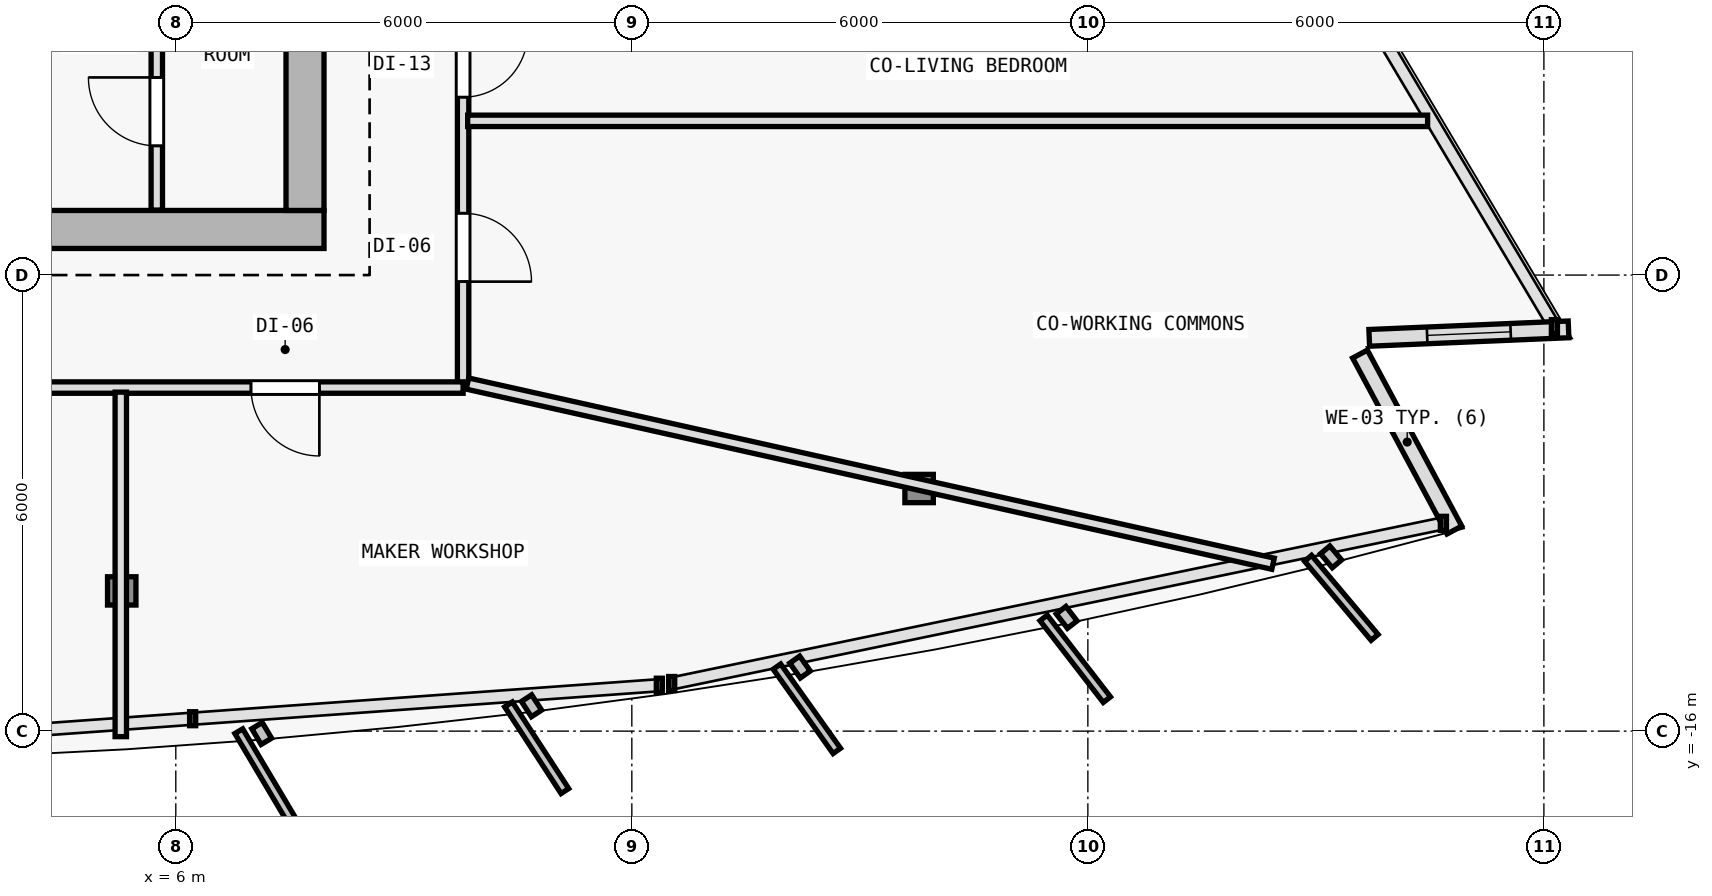
"""IFC4 building model, lengths in metres.
Left out: names, types, materials, properties, quantities, classifications, styles, units other than length and angle.
Written with IfcOpenShell. Run it as: python <this file> out.ifc"""

import sys

from ifc_helpers import new_model, si_unit, direction, frame, frame_2d, origin, origin_2d, place, context, subcontext, project, spatial, rectangle, i_section, extrude, element, fill, save


model = new_model("IFC4")
c1 = context("Model", 3, precision=1e-05, world=origin(), true_north=direction((0.0, 1.0)))
c2 = subcontext(c1, "Body", "Model", "MODEL_VIEW")
j1 = project(units=[si_unit("LENGTHUNIT", "METRE"), si_unit("PLANEANGLEUNIT", "RADIAN")], contexts=[c1])
p1 = place(None, origin())
s1 = spatial("IfcSite", under=j1, at=p1, CompositionType="ELEMENT")
p2 = place(p1, origin())
s2 = spatial("IfcBuilding", under=s1, at=p2, CompositionType="ELEMENT")
p3 = place(p2, frame((0.0, 0.0, 258.0)))
s3 = spatial("IfcBuildingStorey", under=s2, at=p3, CompositionType="ELEMENT", Elevation=258.0)
p4 = place(p3, frame((7.7, -9.4, 0.0), z_axis=(0.0, 0.0, 1.0), x_axis=(1.0, 0.0, 0.0)))
e1 = element("IfcColumn", 1, at=p4, inside=s3, PredefinedType="COLUMN", context=c2, shape_type="SweptSolid", body=[
    extrude(i_section(OverallWidth=0.374, OverallDepth=0.372, WebThickness=0.012, FlangeThickness=0.02, FilletRadius=0.015, at=origin_2d()), origin(), (0.0, 0.0, 1.0), 3.6),
])
p5 = place(p3, frame((5.289, -14.155, 0.006), z_axis=(-0.006934288159, 0.035283289748, 0.999353293441), x_axis=(-0.981229659911, -0.192842823335, 0.0)))
e2 = element("IfcColumn", 2, at=p5, inside=s3, PredefinedType="COLUMN", context=c2, shape_type="SweptSolid", body=[
    extrude(i_section(OverallWidth=0.374, OverallDepth=0.372, WebThickness=0.012, FlangeThickness=0.02, FilletRadius=0.015, at=origin_2d()), origin(), (0.0, 0.0, 1.0), 3.591),
])
p6 = place(p3, frame((15.78, -12.808, 0.006), z_axis=(-0.020596292833, 0.033511459955, 0.999226087917), x_axis=(-0.851954850327, -0.523615252838, 0.0)))
e3 = element("IfcColumn", 3, at=p6, inside=s3, PredefinedType="COLUMN", context=c2, shape_type="SweptSolid", body=[
    extrude(i_section(OverallWidth=0.374, OverallDepth=0.372, WebThickness=0.012, FlangeThickness=0.02, FilletRadius=0.015, at=origin_2d()), origin(), (0.0, 0.0, 1.0), 3.592),
])
p7 = place(p3, frame((21.581, -11.04, 0.0), z_axis=(0.0, 0.0, 1.0), x_axis=(0.472791303324, -0.881174434208, 0.0)))
e4 = element("IfcWall", 4, at=p7, inside=s3, PredefinedType="SOLIDWALL", context=c2, shape_type="SweptSolid", body=[
    extrude(rectangle(XDim=2.627, YDim=0.22, at=frame_2d((1.313, 0.0))), origin(), (0.0, 0.0, 1.0), 3.35),
])
p8 = place(p3, frame((24.324, -10.714, 0.0), z_axis=(0.0, 0.0, 1.0), x_axis=(-0.999095924753, -0.042512740932, 0.0)))
e5 = element("IfcWall", 5, at=p8, inside=s3, PredefinedType="SOLIDWALL", context=c2, shape_type="SweptSolid", body=[
    extrude(rectangle(XDim=2.625, YDim=0.22, at=frame_2d((1.312, 0.0))), origin(), (0.0, 0.0, 1.0), 3.35),
])
p9 = place(p8, frame((0.762, 0.0, 0.62)))
e6 = element("IfcOpeningElement", 6, at=p9, cuts=e5, PredefinedType="OPENING", context=c2, shape_type="SweptSolid", body=[
    extrude(rectangle(XDim=1.1, YDim=1.8, at=frame_2d((0.55, 0.9))), frame((0.0, 0.12, 0.0), z_axis=(0.0, -1.0, 0.0), x_axis=(1.0, 0.0, 0.0)), (0.0, 0.0, 1.0), 0.24),
])
p10 = place(p3, frame((-7.95, -9.4, 0.0), z_axis=(0.0, 0.0, 1.0), x_axis=(1.0, 0.0, 0.0)))
e7 = element("IfcWall", 7, at=p10, inside=s3, PredefinedType="SHEAR", context=c2, shape_type="SweptSolid", body=[
    extrude(rectangle(XDim=15.9, YDim=0.5, at=frame_2d((7.95, 0.0))), origin(), (0.0, 0.0, 1.0), 3.35),
])
p11 = place(p10, frame((9.6, 0.0, 0.0)))
e8 = element("IfcOpeningElement", 8, at=p11, cuts=e7, PredefinedType="OPENING", context=c2, shape_type="SweptSolid", body=[
    extrude(rectangle(XDim=1.5, YDim=2.2, at=frame_2d((0.75, 1.1))), frame((0.0, 0.26, 0.0), z_axis=(0.0, -1.0, 0.0), x_axis=(1.0, 0.0, 0.0)), (0.0, 0.0, 1.0), 0.52),
])
p12 = place(p3, frame((7.7, 9.95, 0.0), z_axis=(0.0, 0.0, 1.0), x_axis=(0.0, -1.0, 0.0)))
e9 = element("IfcWall", 9, at=p12, inside=s3, PredefinedType="SHEAR", context=c2, shape_type="SweptSolid", body=[
    extrude(rectangle(XDim=19.1, YDim=0.5, at=frame_2d((9.55, 0.0))), origin(), (0.0, 0.0, 1.0), 3.35),
])
p13 = place(p3, frame((5.75, -9.145, 0.0), z_axis=(0.0, 0.0, 1.0), x_axis=(0.0, 1.0, 0.0)))
e10 = element("IfcWall", 10, at=p13, inside=s3, PredefinedType="PARTITIONING", context=c2, shape_type="SweptSolid", body=[
    extrude(rectangle(XDim=3.095, YDim=0.15, at=frame_2d((1.547, 0.0))), origin(), (0.0, 0.0, 1.0), 3.35),
])
p14 = place(p13, frame((0.845, 0.0, 0.0)))
e11 = element("IfcOpeningElement", 11, at=p14, cuts=e10, PredefinedType="OPENING", context=c2, shape_type="SweptSolid", body=[
    extrude(rectangle(XDim=0.9, YDim=2.1, at=frame_2d((0.45, 1.05))), frame((0.0, 0.085, 0.0), z_axis=(0.0, -1.0, 0.0), x_axis=(1.0, 0.0, 0.0)), (0.0, 0.0, 1.0), 0.17),
])
p15 = place(p3, frame((9.78, 8.226, 0.0), z_axis=(0.0, 0.0, 1.0), x_axis=(0.0, -1.0, 0.0)))
e12 = element("IfcWall", 12, at=p15, inside=s3, PredefinedType="PARTITIONING", context=c2, shape_type="SweptSolid", body=[
    extrude(rectangle(XDim=19.706, YDim=0.15, at=frame_2d((9.853, 0.0))), origin(), (0.0, 0.0, 1.0), 2.725),
])
p16 = place(p15, frame((17.412, 0.0, 0.0)))
e13 = element("IfcOpeningElement", 13, at=p16, cuts=e12, PredefinedType="OPENING", context=c2, shape_type="SweptSolid", body=[
    extrude(rectangle(XDim=0.9, YDim=2.1, at=frame_2d((0.45, 1.05))), frame((0.0, 0.085, 0.0), z_axis=(0.0, -1.0, 0.0), x_axis=(1.0, 0.0, 0.0)), (0.0, 0.0, 1.0), 0.17),
])
p17 = place(p15, frame((15.036, 0.0, 0.0)))
e14 = element("IfcOpeningElement", 14, at=p17, cuts=e12, PredefinedType="OPENING", context=c2, shape_type="SweptSolid", body=[
    extrude(rectangle(XDim=0.85, YDim=2.1, at=frame_2d((0.425, 1.05))), frame((0.0, 0.085, 0.0), z_axis=(0.0, -1.0, 0.0), x_axis=(1.0, 0.0, 0.0)), (0.0, 0.0, 1.0), 0.17),
])
p18 = place(p15, frame((13.54, 0.0, 0.0)))
e15 = element("IfcOpeningElement", 15, at=p18, cuts=e12, PredefinedType="OPENING", context=c2, shape_type="SweptSolid", body=[
    extrude(rectangle(XDim=0.85, YDim=2.1, at=frame_2d((0.425, 1.05))), frame((0.0, 0.085, 0.0), z_axis=(0.0, -1.0, 0.0), x_axis=(1.0, 0.0, 0.0)), (0.0, 0.0, 1.0), 0.17),
])
p19 = place(p15, frame((11.975, 0.0, 0.0)))
e16 = element("IfcOpeningElement", 16, at=p19, cuts=e12, PredefinedType="OPENING", context=c2, shape_type="SweptSolid", body=[
    extrude(rectangle(XDim=0.85, YDim=2.1, at=frame_2d((0.425, 1.05))), frame((0.0, 0.085, 0.0), z_axis=(0.0, -1.0, 0.0), x_axis=(1.0, 0.0, 0.0)), (0.0, 0.0, 1.0), 0.17),
])
p20 = place(p15, frame((9.9, 0.0, 0.0)))
e17 = element("IfcOpeningElement", 17, at=p20, cuts=e12, PredefinedType="OPENING", context=c2, shape_type="SweptSolid", body=[
    extrude(rectangle(XDim=0.9, YDim=2.1, at=frame_2d((0.45, 1.05))), frame((0.0, 0.085, 0.0), z_axis=(0.0, -1.0, 0.0), x_axis=(1.0, 0.0, 0.0)), (0.0, 0.0, 1.0), 0.17),
])
p21 = place(p15, frame((7.347, 0.0, 0.0)))
e18 = element("IfcOpeningElement", 18, at=p21, cuts=e12, PredefinedType="OPENING", context=c2, shape_type="SweptSolid", body=[
    extrude(rectangle(XDim=0.9, YDim=2.1, at=frame_2d((0.45, 1.05))), frame((0.0, 0.085, 0.0), z_axis=(0.0, -1.0, 0.0), x_axis=(1.0, 0.0, 0.0)), (0.0, 0.0, 1.0), 0.17),
])
p22 = place(p15, frame((4.758, 0.0, 0.0)))
e19 = element("IfcOpeningElement", 19, at=p22, cuts=e12, PredefinedType="OPENING", context=c2, shape_type="SweptSolid", body=[
    extrude(rectangle(XDim=0.9, YDim=2.1, at=frame_2d((0.45, 1.05))), frame((0.0, 0.085, 0.0), z_axis=(0.0, -1.0, 0.0), x_axis=(1.0, 0.0, 0.0)), (0.0, 0.0, 1.0), 0.17),
])
p23 = place(p3, frame((9.78, -11.48, 0.0), z_axis=(0.0, 0.0, 1.0), x_axis=(-1.0, 0.0, 0.0)))
e20 = element("IfcWall", 20, at=p23, inside=s3, PredefinedType="PARTITIONING", context=c2, shape_type="SweptSolid", body=[
    extrude(rectangle(XDim=19.56, YDim=0.15, at=frame_2d((9.78, 0.0))), origin(), (0.0, 0.0, 1.0), 2.725),
])
p24 = place(p23, frame((17.239, 0.0, 0.0)))
e21 = element("IfcOpeningElement", 21, at=p24, cuts=e20, PredefinedType="OPENING", context=c2, shape_type="SweptSolid", body=[
    extrude(rectangle(XDim=0.9, YDim=2.1, at=frame_2d((0.45, 1.05))), frame((0.0, 0.085, 0.0), z_axis=(0.0, -1.0, 0.0), x_axis=(1.0, 0.0, 0.0)), (0.0, 0.0, 1.0), 0.17),
])
p25 = place(p23, frame((9.8, 0.0, 0.0)))
e22 = element("IfcOpeningElement", 22, at=p25, cuts=e20, PredefinedType="OPENING", context=c2, shape_type="SweptSolid", body=[
    extrude(rectangle(XDim=0.9, YDim=2.1, at=frame_2d((0.45, 1.05))), frame((0.0, 0.085, 0.0), z_axis=(0.0, -1.0, 0.0), x_axis=(1.0, 0.0, 0.0)), (0.0, 0.0, 1.0), 0.17),
])
p26 = place(p23, frame((1.891, 0.0, 0.0)))
e23 = element("IfcOpeningElement", 23, at=p26, cuts=e20, PredefinedType="OPENING", context=c2, shape_type="SweptSolid", body=[
    extrude(rectangle(XDim=0.9, YDim=2.1, at=frame_2d((0.45, 1.05))), frame((0.0, 0.085, 0.0), z_axis=(0.0, -1.0, 0.0), x_axis=(1.0, 0.0, 0.0)), (0.0, 0.0, 1.0), 0.17),
])
p27 = place(p3, frame((5.276, -11.54, 0.0), z_axis=(0.0, 0.0, 1.0), x_axis=(0.0, -1.0, 0.0)))
e24 = element("IfcWall", 24, at=p27, inside=s3, PredefinedType="PARTITIONING", context=c2, shape_type="SweptSolid", body=[
    extrude(rectangle(XDim=4.532, YDim=0.15, at=frame_2d((2.266, 0.0))), origin(), (0.0, 0.0, 1.0), 2.725),
])
p28 = place(p3, frame((9.837, -11.427, 0.0), z_axis=(0.0, 0.0, 1.0), x_axis=(0.975894754953, -0.218241671676, 0.0)))
e25 = element("IfcWall", 25, at=p28, inside=s3, PredefinedType="PARTITIONING", context=c2, shape_type="SweptSolid", body=[
    extrude(rectangle(XDim=10.861, YDim=0.15, at=frame_2d((5.431, 0.0))), origin(), (0.0, 0.0, 1.0), 2.725),
])
p29 = place(p3, frame((9.84, -7.971, 0.0), z_axis=(0.0, 0.0, 1.0), x_axis=(1.0, 0.0, 0.0)))
e26 = element("IfcWall", 26, at=p29, inside=s3, PredefinedType="PARTITIONING", context=c2, shape_type="SweptSolid", body=[
    extrude(rectangle(XDim=12.63, YDim=0.15, at=frame_2d((6.315, 0.0))), origin(), (0.0, 0.0, 1.0), 2.875),
])
p30 = place(p9, origin())
e27 = element("IfcWindow", 27, at=p30, inside=s3, PartitioningType="SINGLE_PANEL", PredefinedType="WINDOW", context=c2, shape_type="SweptSolid", body=[
    extrude(rectangle(XDim=1.1, YDim=1.8, at=frame_2d((0.55, 0.9))), frame((0.0, 0.03, 0.0), z_axis=(0.0, -1.0, 0.0), x_axis=(1.0, 0.0, 0.0)), (0.0, 0.0, 1.0), 0.06),
])
fill(e6, e27)
p31 = place(p14, origin())
e28 = element("IfcDoor", 28, at=p31, inside=s3, OperationType="SINGLE_SWING_RIGHT", PredefinedType="DOOR", context=c2, shape_type="SweptSolid", body=[
    extrude(rectangle(XDim=0.9, YDim=2.1, at=frame_2d((0.45, 1.05))), frame((0.0, 0.025, 0.0), z_axis=(0.0, -1.0, 0.0), x_axis=(1.0, 0.0, 0.0)), (0.0, 0.0, 1.0), 0.05),
])
fill(e11, e28)
p32 = place(p26, origin())
e29 = element("IfcDoor", 29, at=p32, inside=s3, OperationType="SINGLE_SWING_LEFT", PredefinedType="DOOR", context=c2, shape_type="SweptSolid", body=[
    extrude(rectangle(XDim=0.9, YDim=2.1, at=frame_2d((0.45, 1.05))), frame((0.0, 0.025, 0.0), z_axis=(0.0, -1.0, 0.0), x_axis=(1.0, 0.0, 0.0)), (0.0, 0.0, 1.0), 0.05),
])
fill(e23, e29)
p33 = place(p16, origin())
e30 = element("IfcDoor", 30, at=p33, inside=s3, OperationType="SINGLE_SWING_RIGHT", PredefinedType="DOOR", context=c2, shape_type="SweptSolid", body=[
    extrude(rectangle(XDim=0.9, YDim=2.1, at=frame_2d((0.45, 1.05))), frame((0.0, 0.025, 0.0), z_axis=(0.0, -1.0, 0.0), x_axis=(1.0, 0.0, 0.0)), (0.0, 0.0, 1.0), 0.05),
])
fill(e13, e30)
p34 = place(p17, origin())
e31 = element("IfcDoor", 31, at=p34, inside=s3, OperationType="SINGLE_SWING_LEFT", PredefinedType="DOOR", context=c2, shape_type="SweptSolid", body=[
    extrude(rectangle(XDim=0.85, YDim=2.1, at=frame_2d((0.425, 1.05))), frame((0.0, 0.025, 0.0), z_axis=(0.0, -1.0, 0.0), x_axis=(1.0, 0.0, 0.0)), (0.0, 0.0, 1.0), 0.05),
])
fill(e14, e31)
save(model, sys.argv[1])
